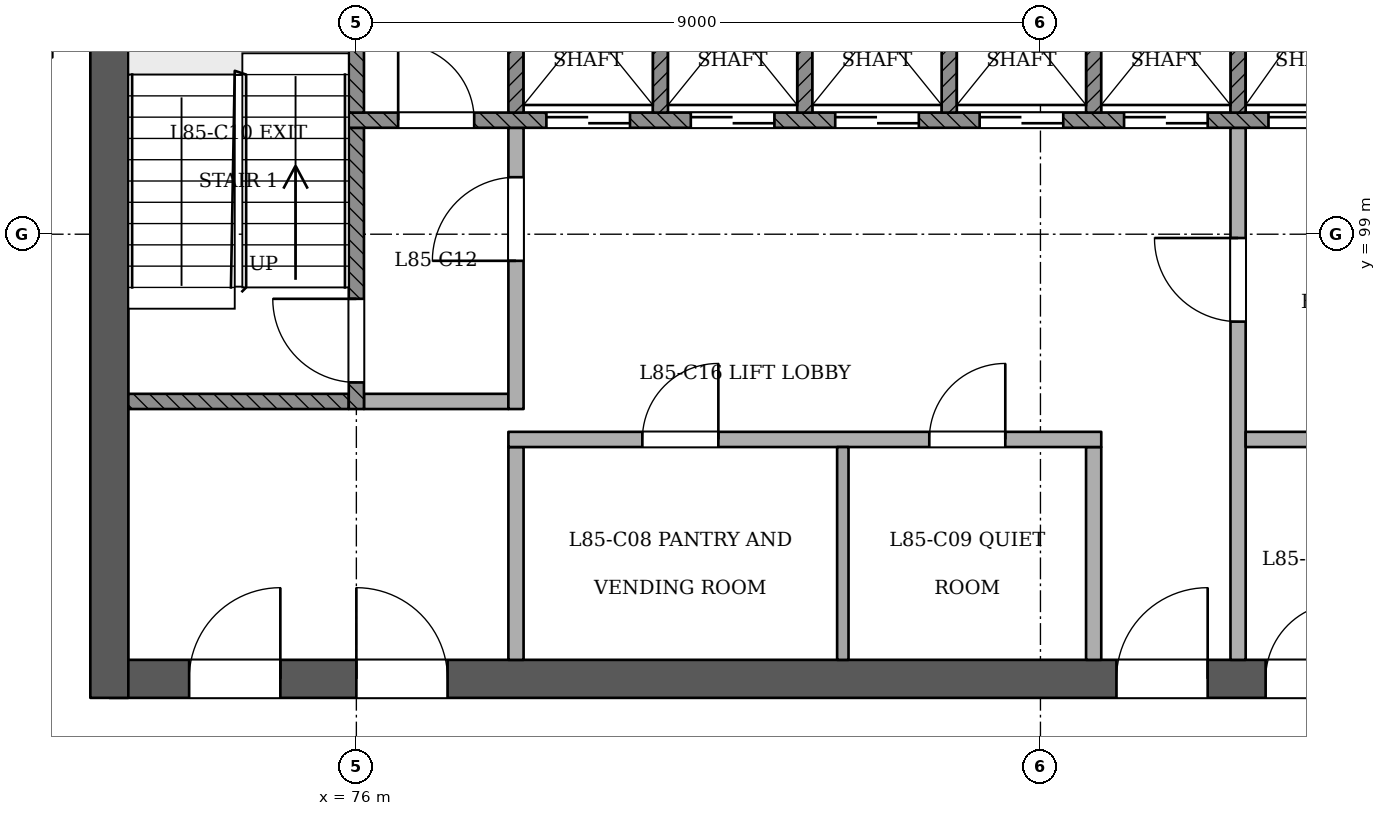
"""IFC4 building model, lengths in metres.
Left out: names, types, materials, properties, quantities, classifications, styles, units other than length and angle.
Written with IfcOpenShell. Run it as: python <this file> out.ifc"""

import sys

from ifc_helpers import new_model, si_unit, direction, frame, frame_2d, origin, place, context, subcontext, project, spatial, rectangle, extrude, element, fill, save


model = new_model("IFC4")
c1 = context("Model", 3, precision=1e-05, world=origin(), true_north=direction((0.0, 1.0)))
c2 = subcontext(c1, "Body", "Model", "MODEL_VIEW")
j1 = project(units=[si_unit("LENGTHUNIT", "METRE"), si_unit("PLANEANGLEUNIT", "RADIAN")], contexts=[c1])
p1 = place(None, origin())
s1 = spatial("IfcSite", under=j1, at=p1, CompositionType="ELEMENT")
p2 = place(p1, origin())
s2 = spatial("IfcBuilding", under=s1, at=p2, CompositionType="ELEMENT")
p3 = place(p2, frame((0.0, 0.0, 327.4)))
s3 = spatial("IfcBuildingStorey", under=s2, at=p3, CompositionType="ELEMENT", Elevation=327.4)
p4 = place(p3, frame((72.75, 93.15, 0.0), z_axis=(0.0, 0.0, 1.0), x_axis=(1.0, 0.0, 0.0)))
e1 = element("IfcWall", 1, at=p4, inside=s3, PredefinedType="SHEAR", context=c2, shape_type="SweptSolid", body=[
    extrude(rectangle(XDim=24.75, YDim=0.5, at=frame_2d((12.375, 0.0))), origin(), (0.0, 0.0, 1.0), 3.6),
])
p5 = place(p4, frame((1.05, 0.0, 0.0)))
e2 = element("IfcOpeningElement", 2, at=p5, cuts=e1, PredefinedType="OPENING", context=c2, shape_type="SweptSolid", body=[
    extrude(rectangle(XDim=1.2, YDim=2.1, at=frame_2d((0.6, 1.05))), frame((0.0, 0.26, 0.0), z_axis=(0.0, -1.0, 0.0), x_axis=(1.0, 0.0, 0.0)), (0.0, 0.0, 1.0), 0.521),
])
p6 = place(p4, frame((3.25, 0.0, 0.0)))
e3 = element("IfcOpeningElement", 3, at=p6, cuts=e1, PredefinedType="OPENING", context=c2, shape_type="SweptSolid", body=[
    extrude(rectangle(XDim=1.2, YDim=2.1, at=frame_2d((0.6, 1.05))), frame((0.0, 0.26, 0.0), z_axis=(0.0, -1.0, 0.0), x_axis=(1.0, 0.0, 0.0)), (0.0, 0.0, 1.0), 0.521),
])
p7 = place(p4, frame((13.25, 0.0, 0.0)))
e4 = element("IfcOpeningElement", 4, at=p7, cuts=e1, PredefinedType="OPENING", context=c2, shape_type="SweptSolid", body=[
    extrude(rectangle(XDim=1.2, YDim=2.1, at=frame_2d((0.6, 1.05))), frame((0.0, 0.26, 0.0), z_axis=(0.0, -1.0, 0.0), x_axis=(1.0, 0.0, 0.0)), (0.0, 0.0, 1.0), 0.521),
])
p8 = place(p4, frame((15.212, 0.0, 0.0)))
e5 = element("IfcOpeningElement", 5, at=p8, cuts=e1, PredefinedType="OPENING", context=c2, shape_type="SweptSolid", body=[
    extrude(rectangle(XDim=1.0, YDim=2.1, at=frame_2d((0.5, 1.05))), frame((0.0, 0.26, 0.0), z_axis=(0.0, -1.0, 0.0), x_axis=(1.0, 0.0, 0.0)), (0.0, 0.0, 1.0), 0.521),
])
p9 = place(p4, frame((18.05, 0.0, 0.0)))
e6 = element("IfcOpeningElement", 6, at=p9, cuts=e1, PredefinedType="OPENING", context=c2, shape_type="SweptSolid", body=[
    extrude(rectangle(XDim=1.0, YDim=2.1, at=frame_2d((0.5, 1.05))), frame((0.0, 0.26, 0.0), z_axis=(0.0, -1.0, 0.0), x_axis=(1.0, 0.0, 0.0)), (0.0, 0.0, 1.0), 0.521),
])
p10 = place(p4, frame((20.95, 0.0, 0.0)))
e7 = element("IfcOpeningElement", 7, at=p10, cuts=e1, PredefinedType="OPENING", context=c2, shape_type="SweptSolid", body=[
    extrude(rectangle(XDim=1.0, YDim=2.1, at=frame_2d((0.5, 1.05))), frame((0.0, 0.26, 0.0), z_axis=(0.0, -1.0, 0.0), x_axis=(1.0, 0.0, 0.0)), (0.0, 0.0, 1.0), 0.521),
])
p11 = place(p4, frame((22.837, 0.0, 0.0)))
e8 = element("IfcOpeningElement", 8, at=p11, cuts=e1, PredefinedType="OPENING", context=c2, shape_type="SweptSolid", body=[
    extrude(rectangle(XDim=1.0, YDim=2.1, at=frame_2d((0.5, 1.05))), frame((0.0, 0.26, 0.0), z_axis=(0.0, -1.0, 0.0), x_axis=(1.0, 0.0, 0.0)), (0.0, 0.0, 1.0), 0.521),
])
p12 = place(p3, frame((72.75, 103.65, 0.0), z_axis=(0.0, 0.0, 1.0), x_axis=(0.0, -1.0, 0.0)))
e9 = element("IfcWall", 9, at=p12, inside=s3, PredefinedType="SHEAR", context=c2, shape_type="SweptSolid", body=[
    extrude(rectangle(XDim=10.75, YDim=0.5, at=frame_2d((5.375, 0.0))), origin(), (0.0, 0.0, 1.0), 3.6),
])
p13 = place(p3, frame((78.1, 93.4, 0.0), z_axis=(0.0, 0.0, 1.0), x_axis=(0.0, 1.0, 0.0)))
e10 = element("IfcWall", 10, at=p13, inside=s3, PredefinedType="PARTITIONING", context=c2, shape_type="SweptSolid", body=[
    extrude(rectangle(XDim=2.8, YDim=0.2, at=frame_2d((1.4, 0.0))), origin(), (0.0, 0.0, 1.0), 3.2),
])
p14 = place(p3, frame((82.4, 93.4, 0.0), z_axis=(0.0, 0.0, 1.0), x_axis=(0.0, 1.0, 0.0)))
e11 = element("IfcWall", 11, at=p14, inside=s3, PredefinedType="PARTITIONING", context=c2, shape_type="SweptSolid", body=[
    extrude(rectangle(XDim=2.8, YDim=0.15, at=frame_2d((1.4, 0.0))), origin(), (0.0, 0.0, 1.0), 3.2),
])
p15 = place(p3, frame((85.7, 93.4, 0.0), z_axis=(0.0, 0.0, 1.0), x_axis=(0.0, 1.0, 0.0)))
e12 = element("IfcWall", 12, at=p15, inside=s3, PredefinedType="PARTITIONING", context=c2, shape_type="SweptSolid", body=[
    extrude(rectangle(XDim=2.8, YDim=0.2, at=frame_2d((1.4, 0.0))), origin(), (0.0, 0.0, 1.0), 3.2),
])
p16 = place(p3, frame((87.6, 93.4, 0.0), z_axis=(0.0, 0.0, 1.0), x_axis=(0.0, 1.0, 0.0)))
e13 = element("IfcWall", 13, at=p16, inside=s3, PredefinedType="PARTITIONING", context=c2, shape_type="SweptSolid", body=[
    extrude(rectangle(XDim=7.0, YDim=0.2, at=frame_2d((3.5, 0.0))), origin(), (0.0, 0.0, 1.0), 3.2),
])
p17 = place(p16, frame((4.45, 0.0, 0.0)))
e14 = element("IfcOpeningElement", 14, at=p17, cuts=e13, PredefinedType="OPENING", context=c2, shape_type="SweptSolid", body=[
    extrude(rectangle(XDim=1.1, YDim=2.1, at=frame_2d((0.55, 1.05))), frame((0.0, 0.11, 0.0), z_axis=(0.0, -1.0, 0.0), x_axis=(1.0, 0.0, 0.0)), (0.0, 0.0, 1.0), 0.221),
])
p18 = place(p3, frame((78.0, 96.3, 0.0), z_axis=(0.0, 0.0, 1.0), x_axis=(1.0, 0.0, 0.0)))
e15 = element("IfcWall", 15, at=p18, inside=s3, PredefinedType="PARTITIONING", context=c2, shape_type="SweptSolid", body=[
    extrude(rectangle(XDim=7.8, YDim=0.2, at=frame_2d((3.9, 0.0))), origin(), (0.0, 0.0, 1.0), 3.2),
])
p19 = place(p18, frame((1.762, 0.0, 0.0)))
e16 = element("IfcOpeningElement", 16, at=p19, cuts=e15, PredefinedType="OPENING", context=c2, shape_type="SweptSolid", body=[
    extrude(rectangle(XDim=1.0, YDim=2.1, at=frame_2d((0.5, 1.05))), frame((0.0, 0.11, 0.0), z_axis=(0.0, -1.0, 0.0), x_axis=(1.0, 0.0, 0.0)), (0.0, 0.0, 1.0), 0.221),
])
p20 = place(p18, frame((5.538, 0.0, 0.0)))
e17 = element("IfcOpeningElement", 17, at=p20, cuts=e15, PredefinedType="OPENING", context=c2, shape_type="SweptSolid", body=[
    extrude(rectangle(XDim=1.0, YDim=2.1, at=frame_2d((0.5, 1.05))), frame((0.0, 0.11, 0.0), z_axis=(0.0, -1.0, 0.0), x_axis=(1.0, 0.0, 0.0)), (0.0, 0.0, 1.0), 0.221),
])
p21 = place(p3, frame((87.7, 96.3, 0.0), z_axis=(0.0, 0.0, 1.0), x_axis=(1.0, 0.0, 0.0)))
e18 = element("IfcWall", 18, at=p21, inside=s3, PredefinedType="PARTITIONING", context=c2, shape_type="SweptSolid", body=[
    extrude(rectangle(XDim=3.6, YDim=0.2, at=frame_2d((1.8, 0.0))), origin(), (0.0, 0.0, 1.0), 3.2),
])
p22 = place(p3, frame((73.0, 96.8, 0.0), z_axis=(0.0, 0.0, 1.0), x_axis=(1.0, 0.0, 0.0)))
e19 = element("IfcWall", 19, at=p22, inside=s3, PredefinedType="SOLIDWALL", context=c2, shape_type="SweptSolid", body=[
    extrude(rectangle(XDim=2.9, YDim=0.2, at=frame_2d((1.45, 0.0))), origin(), (0.0, 0.0, 1.0), 3.2),
])
p23 = place(p3, frame((76.0, 96.7, 0.0), z_axis=(0.0, 0.0, 1.0), x_axis=(0.0, 1.0, 0.0)))
e20 = element("IfcWall", 20, at=p23, inside=s3, PredefinedType="SOLIDWALL", context=c2, shape_type="SweptSolid", body=[
    extrude(rectangle(XDim=3.7, YDim=0.2, at=frame_2d((1.85, 0.0))), origin(), (0.0, 0.0, 1.0), 3.2),
])
p24 = place(p23, frame((0.35, 0.0, 0.0)))
e21 = element("IfcOpeningElement", 21, at=p24, cuts=e20, PredefinedType="OPENING", context=c2, shape_type="SweptSolid", body=[
    extrude(rectangle(XDim=1.1, YDim=2.1, at=frame_2d((0.55, 1.05))), frame((0.0, 0.11, 0.0), z_axis=(0.0, -1.0, 0.0), x_axis=(1.0, 0.0, 0.0)), (0.0, 0.0, 1.0), 0.221),
])
p25 = place(p3, frame((76.1, 96.8, 0.0), z_axis=(0.0, 0.0, 1.0), x_axis=(1.0, 0.0, 0.0)))
e22 = element("IfcWall", 22, at=p25, inside=s3, PredefinedType="PARTITIONING", context=c2, shape_type="SweptSolid", body=[
    extrude(rectangle(XDim=1.9, YDim=0.2, at=frame_2d((0.95, 0.0))), origin(), (0.0, 0.0, 1.0), 3.2),
])
p26 = place(p3, frame((78.1, 96.7, 0.0), z_axis=(0.0, 0.0, 1.0), x_axis=(0.0, 1.0, 0.0)))
e23 = element("IfcWall", 23, at=p26, inside=s3, PredefinedType="PARTITIONING", context=c2, shape_type="SweptSolid", body=[
    extrude(rectangle(XDim=3.7, YDim=0.2, at=frame_2d((1.85, 0.0))), origin(), (0.0, 0.0, 1.0), 3.2),
])
p27 = place(p26, frame((1.95, 0.0, 0.0)))
e24 = element("IfcOpeningElement", 24, at=p27, cuts=e23, PredefinedType="OPENING", context=c2, shape_type="SweptSolid", body=[
    extrude(rectangle(XDim=1.1, YDim=2.1, at=frame_2d((0.55, 1.05))), frame((0.0, 0.11, 0.0), z_axis=(0.0, -1.0, 0.0), x_axis=(1.0, 0.0, 0.0)), (0.0, 0.0, 1.0), 0.221),
])
p28 = place(p3, frame((75.9, 100.5, 0.0), z_axis=(0.0, 0.0, 1.0), x_axis=(1.0, 0.0, 0.0)))
e25 = element("IfcWall", 25, at=p28, inside=s3, PredefinedType="SOLIDWALL", context=c2, shape_type="SweptSolid", body=[
    extrude(rectangle(XDim=18.2, YDim=0.2, at=frame_2d((9.1, 0.0))), origin(), (0.0, 0.0, 1.0), 3.2),
])
p29 = place(p28, frame((2.6, 0.0, 0.0)))
e26 = element("IfcOpeningElement", 26, at=p29, cuts=e25, PredefinedType="OPENING", context=c2, shape_type="SweptSolid", body=[
    extrude(rectangle(XDim=1.1, YDim=2.1, at=frame_2d((0.55, 1.05))), frame((0.0, 0.11, 0.0), z_axis=(0.0, -1.0, 0.0), x_axis=(1.0, 0.0, 0.0)), (0.0, 0.0, 1.0), 0.221),
])
p30 = place(p28, frame((4.5, 0.0, 0.0)))
e27 = element("IfcOpeningElement", 27, at=p30, cuts=e25, PredefinedType="OPENING", context=c2, shape_type="SweptSolid", body=[
    extrude(rectangle(XDim=1.1, YDim=2.1, at=frame_2d((0.55, 1.05))), frame((0.0, 0.11, 0.0), z_axis=(0.0, -1.0, 0.0), x_axis=(1.0, 0.0, 0.0)), (0.0, 0.0, 1.0), 0.221),
])
p31 = place(p28, frame((6.4, 0.0, 0.0)))
e28 = element("IfcOpeningElement", 28, at=p31, cuts=e25, PredefinedType="OPENING", context=c2, shape_type="SweptSolid", body=[
    extrude(rectangle(XDim=1.1, YDim=2.1, at=frame_2d((0.55, 1.05))), frame((0.0, 0.11, 0.0), z_axis=(0.0, -1.0, 0.0), x_axis=(1.0, 0.0, 0.0)), (0.0, 0.0, 1.0), 0.221),
])
p32 = place(p28, frame((8.3, 0.0, 0.0)))
e29 = element("IfcOpeningElement", 29, at=p32, cuts=e25, PredefinedType="OPENING", context=c2, shape_type="SweptSolid", body=[
    extrude(rectangle(XDim=1.1, YDim=2.1, at=frame_2d((0.55, 1.05))), frame((0.0, 0.11, 0.0), z_axis=(0.0, -1.0, 0.0), x_axis=(1.0, 0.0, 0.0)), (0.0, 0.0, 1.0), 0.221),
])
p33 = place(p28, frame((10.2, 0.0, 0.0)))
e30 = element("IfcOpeningElement", 30, at=p33, cuts=e25, PredefinedType="OPENING", context=c2, shape_type="SweptSolid", body=[
    extrude(rectangle(XDim=1.1, YDim=2.1, at=frame_2d((0.55, 1.05))), frame((0.0, 0.11, 0.0), z_axis=(0.0, -1.0, 0.0), x_axis=(1.0, 0.0, 0.0)), (0.0, 0.0, 1.0), 0.221),
])
p34 = place(p28, frame((12.1, 0.0, 0.0)))
e31 = element("IfcOpeningElement", 31, at=p34, cuts=e25, PredefinedType="OPENING", context=c2, shape_type="SweptSolid", body=[
    extrude(rectangle(XDim=1.1, YDim=2.1, at=frame_2d((0.55, 1.05))), frame((0.0, 0.11, 0.0), z_axis=(0.0, -1.0, 0.0), x_axis=(1.0, 0.0, 0.0)), (0.0, 0.0, 1.0), 0.221),
])
p35 = place(p28, frame((14.0, 0.0, 0.0)))
e32 = element("IfcOpeningElement", 32, at=p35, cuts=e25, PredefinedType="OPENING", context=c2, shape_type="SweptSolid", body=[
    extrude(rectangle(XDim=1.1, YDim=2.1, at=frame_2d((0.55, 1.05))), frame((0.0, 0.11, 0.0), z_axis=(0.0, -1.0, 0.0), x_axis=(1.0, 0.0, 0.0)), (0.0, 0.0, 1.0), 0.221),
])
p36 = place(p28, frame((0.65, 0.0, 0.0)))
e33 = element("IfcOpeningElement", 33, at=p36, cuts=e25, PredefinedType="OPENING", context=c2, shape_type="SweptSolid", body=[
    extrude(rectangle(XDim=1.0, YDim=2.1, at=frame_2d((0.5, 1.05))), frame((0.0, 0.11, 0.0), z_axis=(0.0, -1.0, 0.0), x_axis=(1.0, 0.0, 0.0)), (0.0, 0.0, 1.0), 0.221),
])
p37 = place(p28, frame((16.3, 0.0, 0.0)))
e34 = element("IfcOpeningElement", 34, at=p37, cuts=e25, PredefinedType="OPENING", context=c2, shape_type="SweptSolid", body=[
    extrude(rectangle(XDim=1.0, YDim=2.1, at=frame_2d((0.5, 1.05))), frame((0.0, 0.11, 0.0), z_axis=(0.0, -1.0, 0.0), x_axis=(1.0, 0.0, 0.0)), (0.0, 0.0, 1.0), 0.221),
])
for number, where, z_axis, x_axis in (
    (35, (76.0, 100.6, 0.0), (0.0, 0.0, 1.0), (0.0, 1.0, 0.0)),
    (36, (78.1, 100.6, 0.0), (0.0, 0.0, 1.0), (0.0, 1.0, 0.0)),
    (37, (80.0, 100.6, 0.0), (0.0, 0.0, 1.0), (0.0, 1.0, 0.0)),
    (38, (81.9, 100.6, 0.0), (0.0, 0.0, 1.0), (0.0, 1.0, 0.0)),
    (39, (83.8, 100.6, 0.0), (0.0, 0.0, 1.0), (0.0, 1.0, 0.0)),
    (40, (85.7, 100.6, 0.0), (0.0, 0.0, 1.0), (0.0, 1.0, 0.0)),
    (41, (87.6, 100.6, 0.0), (0.0, 0.0, 1.0), (0.0, 1.0, 0.0)),
):
    element("IfcWall", number, at=place(p3, frame(where, z_axis=z_axis, x_axis=x_axis)), inside=s3, PredefinedType="SOLIDWALL", context=c2, shape_type="SweptSolid", body=[
        extrude(rectangle(XDim=2.8, YDim=0.2, at=frame_2d((1.4, 0.0))), origin(), (0.0, 0.0, 1.0), 3.2),
    ])
p38 = place(p29, origin())
e42 = element("IfcDoor", 42, at=p38, inside=s3, OperationType="SLIDING_TO_RIGHT", PredefinedType="NOTDEFINED", context=c2, shape_type="SweptSolid", body=[
    extrude(rectangle(XDim=1.1, YDim=2.1, at=frame_2d((0.55, 1.05))), frame((0.0, 0.025, 0.0), z_axis=(0.0, -1.0, 0.0), x_axis=(1.0, 0.0, 0.0)), (0.0, 0.0, 1.0), 0.05),
])
fill(e26, e42)
p39 = place(p30, origin())
e43 = element("IfcDoor", 43, at=p39, inside=s3, OperationType="SLIDING_TO_LEFT", PredefinedType="NOTDEFINED", context=c2, shape_type="SweptSolid", body=[
    extrude(rectangle(XDim=1.1, YDim=2.1, at=frame_2d((0.55, 1.05))), frame((0.0, 0.025, 0.0), z_axis=(0.0, -1.0, 0.0), x_axis=(1.0, 0.0, 0.0)), (0.0, 0.0, 1.0), 0.05),
])
fill(e27, e43)
p40 = place(p31, origin())
e44 = element("IfcDoor", 44, at=p40, inside=s3, OperationType="SLIDING_TO_RIGHT", PredefinedType="NOTDEFINED", context=c2, shape_type="SweptSolid", body=[
    extrude(rectangle(XDim=1.1, YDim=2.1, at=frame_2d((0.55, 1.05))), frame((0.0, 0.025, 0.0), z_axis=(0.0, -1.0, 0.0), x_axis=(1.0, 0.0, 0.0)), (0.0, 0.0, 1.0), 0.05),
])
fill(e28, e44)
p41 = place(p32, origin())
e45 = element("IfcDoor", 45, at=p41, inside=s3, OperationType="SLIDING_TO_LEFT", PredefinedType="NOTDEFINED", context=c2, shape_type="SweptSolid", body=[
    extrude(rectangle(XDim=1.1, YDim=2.1, at=frame_2d((0.55, 1.05))), frame((0.0, 0.025, 0.0), z_axis=(0.0, -1.0, 0.0), x_axis=(1.0, 0.0, 0.0)), (0.0, 0.0, 1.0), 0.05),
])
fill(e29, e45)
p42 = place(p33, origin())
e46 = element("IfcDoor", 46, at=p42, inside=s3, OperationType="SLIDING_TO_RIGHT", PredefinedType="NOTDEFINED", context=c2, shape_type="SweptSolid", body=[
    extrude(rectangle(XDim=1.1, YDim=2.1, at=frame_2d((0.55, 1.05))), frame((0.0, 0.025, 0.0), z_axis=(0.0, -1.0, 0.0), x_axis=(1.0, 0.0, 0.0)), (0.0, 0.0, 1.0), 0.05),
])
fill(e30, e46)
p43 = place(p34, origin())
e47 = element("IfcDoor", 47, at=p43, inside=s3, OperationType="SLIDING_TO_RIGHT", PredefinedType="NOTDEFINED", context=c2, shape_type="SweptSolid", body=[
    extrude(rectangle(XDim=1.1, YDim=2.1, at=frame_2d((0.55, 1.05))), frame((0.0, 0.025, 0.0), z_axis=(0.0, -1.0, 0.0), x_axis=(1.0, 0.0, 0.0)), (0.0, 0.0, 1.0), 0.05),
])
fill(e31, e47)
p44 = place(p24, origin())
e48 = element("IfcDoor", 48, at=p44, inside=s3, OperationType="SINGLE_SWING_RIGHT", PredefinedType="NOTDEFINED", context=c2, shape_type="SweptSolid", body=[
    extrude(rectangle(XDim=1.1, YDim=2.1, at=frame_2d((0.55, 1.05))), frame((0.0, 0.025, 0.0), z_axis=(0.0, -1.0, 0.0), x_axis=(1.0, 0.0, 0.0)), (0.0, 0.0, 1.0), 0.05),
])
fill(e21, e48)
p45 = place(p27, origin())
e49 = element("IfcDoor", 49, at=p45, inside=s3, OperationType="SINGLE_SWING_LEFT", PredefinedType="NOTDEFINED", context=c2, shape_type="SweptSolid", body=[
    extrude(rectangle(XDim=1.1, YDim=2.1, at=frame_2d((0.55, 1.05))), frame((0.0, 0.025, 0.0), z_axis=(0.0, -1.0, 0.0), x_axis=(1.0, 0.0, 0.0)), (0.0, 0.0, 1.0), 0.05),
])
fill(e24, e49)
p46 = place(p17, origin())
e50 = element("IfcDoor", 50, at=p46, inside=s3, OperationType="SINGLE_SWING_RIGHT", PredefinedType="NOTDEFINED", context=c2, shape_type="SweptSolid", body=[
    extrude(rectangle(XDim=1.1, YDim=2.1, at=frame_2d((0.55, 1.05))), frame((0.0, 0.025, 0.0), z_axis=(0.0, -1.0, 0.0), x_axis=(1.0, 0.0, 0.0)), (0.0, 0.0, 1.0), 0.05),
])
fill(e14, e50)
p47 = place(p5, origin())
e51 = element("IfcDoor", 51, at=p47, inside=s3, OperationType="SINGLE_SWING_RIGHT", PredefinedType="NOTDEFINED", context=c2, shape_type="SweptSolid", body=[
    extrude(rectangle(XDim=1.2, YDim=2.1, at=frame_2d((0.6, 1.05))), frame((0.0, 0.025, 0.0), z_axis=(0.0, -1.0, 0.0), x_axis=(1.0, 0.0, 0.0)), (0.0, 0.0, 1.0), 0.05),
])
fill(e2, e51)
p48 = place(p6, origin())
e52 = element("IfcDoor", 52, at=p48, inside=s3, OperationType="SINGLE_SWING_LEFT", PredefinedType="NOTDEFINED", context=c2, shape_type="SweptSolid", body=[
    extrude(rectangle(XDim=1.2, YDim=2.1, at=frame_2d((0.6, 1.05))), frame((0.0, 0.025, 0.0), z_axis=(0.0, -1.0, 0.0), x_axis=(1.0, 0.0, 0.0)), (0.0, 0.0, 1.0), 0.05),
])
fill(e3, e52)
p49 = place(p7, origin())
e53 = element("IfcDoor", 53, at=p49, inside=s3, OperationType="SINGLE_SWING_RIGHT", PredefinedType="NOTDEFINED", context=c2, shape_type="SweptSolid", body=[
    extrude(rectangle(XDim=1.2, YDim=2.1, at=frame_2d((0.6, 1.05))), frame((0.0, 0.025, 0.0), z_axis=(0.0, -1.0, 0.0), x_axis=(1.0, 0.0, 0.0)), (0.0, 0.0, 1.0), 0.05),
])
fill(e4, e53)
p50 = place(p36, origin())
e54 = element("IfcDoor", 54, at=p50, inside=s3, OperationType="SINGLE_SWING_LEFT", PredefinedType="NOTDEFINED", context=c2, shape_type="SweptSolid", body=[
    extrude(rectangle(XDim=1.0, YDim=2.1, at=frame_2d((0.5, 1.05))), frame((0.0, 0.025, 0.0), z_axis=(0.0, -1.0, 0.0), x_axis=(1.0, 0.0, 0.0)), (0.0, 0.0, 1.0), 0.05),
])
fill(e33, e54)
p51 = place(p8, origin())
e55 = element("IfcDoor", 55, at=p51, inside=s3, OperationType="SINGLE_SWING_RIGHT", PredefinedType="NOTDEFINED", context=c2, shape_type="SweptSolid", body=[
    extrude(rectangle(XDim=1.0, YDim=2.1, at=frame_2d((0.5, 1.05))), frame((0.0, 0.025, 0.0), z_axis=(0.0, -1.0, 0.0), x_axis=(1.0, 0.0, 0.0)), (0.0, 0.0, 1.0), 0.05),
])
fill(e5, e55)
p52 = place(p19, origin())
e56 = element("IfcDoor", 56, at=p52, inside=s3, OperationType="SINGLE_SWING_RIGHT", PredefinedType="NOTDEFINED", context=c2, shape_type="SweptSolid", body=[
    extrude(rectangle(XDim=1.0, YDim=2.1, at=frame_2d((0.5, 1.05))), frame((0.0, 0.025, 0.0), z_axis=(0.0, -1.0, 0.0), x_axis=(1.0, 0.0, 0.0)), (0.0, 0.0, 1.0), 0.05),
])
fill(e16, e56)
p53 = place(p20, origin())
e57 = element("IfcDoor", 57, at=p53, inside=s3, OperationType="SINGLE_SWING_RIGHT", PredefinedType="NOTDEFINED", context=c2, shape_type="SweptSolid", body=[
    extrude(rectangle(XDim=1.0, YDim=2.1, at=frame_2d((0.5, 1.05))), frame((0.0, 0.025, 0.0), z_axis=(0.0, -1.0, 0.0), x_axis=(1.0, 0.0, 0.0)), (0.0, 0.0, 1.0), 0.05),
])
fill(e17, e57)
save(model, sys.argv[1])
